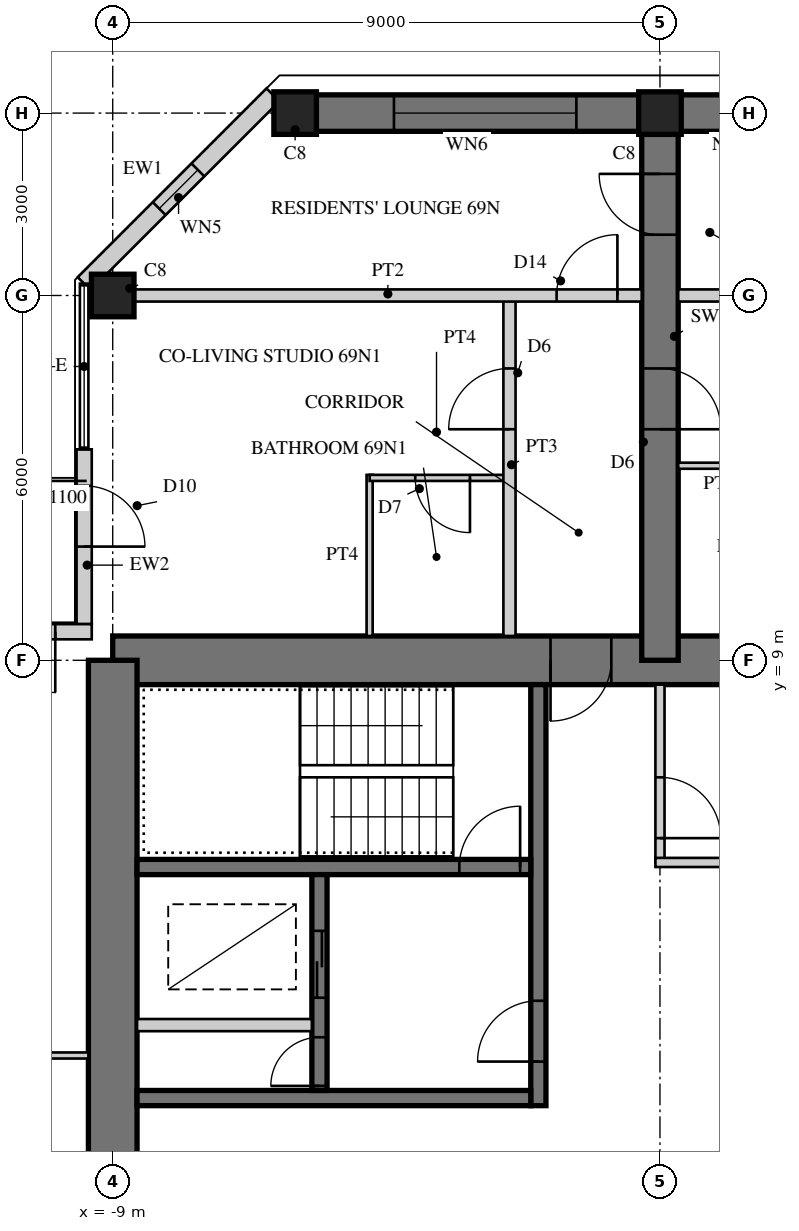
"""IFC4 building model, lengths in metres.
Left out: names, types, materials, properties, quantities, classifications, styles, units other than length and angle.
Written with IfcOpenShell. Run it as: python <this file> out.ifc"""

import sys

from ifc_helpers import new_model, si_unit, direction, frame, frame_2d, origin, origin_2d, place, context, subcontext, project, spatial, rectangle, hollow_rectangle, extrude, element, fill, save


model = new_model("IFC4")
c1 = context("Model", 3, precision=1e-05, world=origin(), true_north=direction((0.0, 1.0)))
c2 = subcontext(c1, "Body", "Model", "MODEL_VIEW")
j1 = project(units=[si_unit("LENGTHUNIT", "METRE"), si_unit("PLANEANGLEUNIT", "RADIAN")], contexts=[c1])
p1 = place(None, origin())
s1 = spatial("IfcSite", under=j1, at=p1, CompositionType="ELEMENT")
p2 = place(p1, origin())
s2 = spatial("IfcBuilding", under=s1, at=p2, CompositionType="ELEMENT")
p3 = place(p2, frame((0.0, 0.0, 267.9)))
s3 = spatial("IfcBuildingStorey", under=s2, at=p3, CompositionType="ELEMENT", Elevation=267.9)
p4 = place(p3, frame((9.0, 9.0, 0.0), z_axis=(0.0, 0.0, 1.0), x_axis=(-1.0, 0.0, 0.0)))
e1 = element("IfcWall", 1, at=p4, inside=s3, PredefinedType="SHEAR", context=c2, shape_type="SweptSolid", body=[
    extrude(rectangle(XDim=18.0, YDim=0.8, at=frame_2d((9.0, 0.0))), origin(), (0.0, 0.0, 1.0), 3.4),
])
p5 = place(p4, frame((9.8, 0.0, 0.0)))
e2 = element("IfcOpeningElement", 2, at=p5, cuts=e1, PredefinedType="OPENING", context=c2, shape_type="SweptSolid", body=[
    extrude(rectangle(XDim=1.0, YDim=2.4, at=frame_2d((0.5, 1.2))), frame((0.0, 0.41, 0.0), z_axis=(0.0, -1.0, 0.0), x_axis=(1.0, 0.0, 0.0)), (0.0, 0.0, 1.0), 0.82),
])
p6 = place(p3, frame((-9.0, 9.0, 0.0), z_axis=(0.0, 0.0, 1.0), x_axis=(0.0, -1.0, 0.0)))
e3 = element("IfcWall", 3, at=p6, inside=s3, PredefinedType="SHEAR", context=c2, shape_type="SweptSolid", body=[
    extrude(rectangle(XDim=18.0, YDim=0.8, at=frame_2d((9.0, 0.0))), origin(), (0.0, 0.0, 1.0), 3.4),
])
p7 = place(p6, frame((9.8, 0.0, 0.0)))
e4 = element("IfcOpeningElement", 4, at=p7, cuts=e3, PredefinedType="OPENING", context=c2, shape_type="SweptSolid", body=[
    extrude(rectangle(XDim=1.0, YDim=2.4, at=frame_2d((0.5, 1.2))), frame((0.0, 0.41, 0.0), z_axis=(0.0, -1.0, 0.0), x_axis=(1.0, 0.0, 0.0)), (0.0, 0.0, 1.0), 0.82),
])
p8 = place(p3, frame((-2.0, 1.675, 0.0), z_axis=(0.0, 0.0, 1.0), x_axis=(0.0, 1.0, 0.0)))
e5 = element("IfcWall", 5, at=p8, inside=s3, PredefinedType="SHEAR", context=c2, shape_type="SweptSolid", body=[
    extrude(rectangle(XDim=6.925, YDim=0.25, at=frame_2d((3.462, 0.0))), origin(), (0.0, 0.0, 1.0), 3.4),
])
p9 = place(p8, frame((0.725, 0.0, 0.0)))
e6 = element("IfcOpeningElement", 6, at=p9, cuts=e5, PredefinedType="OPENING", context=c2, shape_type="SweptSolid", body=[
    extrude(rectangle(XDim=1.0, YDim=2.1, at=frame_2d((0.5, 1.05))), frame((0.0, 0.135, 0.0), z_axis=(0.0, -1.0, 0.0), x_axis=(1.0, 0.0, 0.0)), (0.0, 0.0, 1.0), 0.27),
])
p10 = place(p3, frame((-2.125, 1.8, 0.0), z_axis=(0.0, 0.0, 1.0), x_axis=(-1.0, 0.0, 0.0)))
e7 = element("IfcWall", 7, at=p10, inside=s3, PredefinedType="SHEAR", context=c2, shape_type="SweptSolid", body=[
    extrude(rectangle(XDim=6.475, YDim=0.25, at=frame_2d((3.238, 0.0))), origin(), (0.0, 0.0, 1.0), 3.4),
])
p11 = place(p3, frame((-2.125, 5.6, 0.0), z_axis=(0.0, 0.0, 1.0), x_axis=(-1.0, 0.0, 0.0)))
e8 = element("IfcWall", 8, at=p11, inside=s3, PredefinedType="SHEAR", context=c2, shape_type="SweptSolid", body=[
    extrude(rectangle(XDim=6.475, YDim=0.25, at=frame_2d((3.238, 0.0))), origin(), (0.0, 0.0, 1.0), 3.4),
])
p12 = place(p11, frame((0.175, 0.0, 0.0)))
e9 = element("IfcOpeningElement", 9, at=p12, cuts=e8, PredefinedType="OPENING", context=c2, shape_type="SweptSolid", body=[
    extrude(rectangle(XDim=1.0, YDim=2.1, at=frame_2d((0.5, 1.05))), frame((0.0, 0.135, 0.0), z_axis=(0.0, -1.0, 0.0), x_axis=(1.0, 0.0, 0.0)), (0.0, 0.0, 1.0), 0.27),
])
p13 = place(p3, frame((-5.6, 1.925, 0.0), z_axis=(0.0, 0.0, 1.0), x_axis=(0.0, 1.0, 0.0)))
e10 = element("IfcWall", 10, at=p13, inside=s3, PredefinedType="SHEAR", context=c2, shape_type="SweptSolid", body=[
    extrude(rectangle(XDim=3.55, YDim=0.25, at=frame_2d((1.775, 0.0))), origin(), (0.0, 0.0, 1.0), 3.4),
])
p14 = place(p13, frame((1.525, 0.0, 0.0)))
e11 = element("IfcOpeningElement", 11, at=p14, cuts=e10, PredefinedType="OPENING", context=c2, shape_type="SweptSolid", body=[
    extrude(rectangle(XDim=1.1, YDim=2.2, at=frame_2d((0.55, 1.1))), frame((0.0, 0.135, 0.0), z_axis=(0.0, -1.0, 0.0), x_axis=(1.0, 0.0, 0.0)), (0.0, 0.0, 1.0), 0.27),
])
p15 = place(p13, frame((0.075, 0.0, 0.0)))
e12 = element("IfcOpeningElement", 12, at=p15, cuts=e10, PredefinedType="OPENING", context=c2, shape_type="SweptSolid", body=[
    extrude(rectangle(XDim=0.8, YDim=2.1, at=frame_2d((0.4, 1.05))), frame((0.0, 0.135, 0.0), z_axis=(0.0, -1.0, 0.0), x_axis=(1.0, 0.0, 0.0)), (0.0, 0.0, 1.0), 0.27),
])
p16 = place(p3, frame((-5.725, 3.0, 0.0), z_axis=(0.0, 0.0, 1.0), x_axis=(-1.0, 0.0, 0.0)))
e13 = element("IfcWall", 13, at=p16, inside=s3, PredefinedType="PARTITIONING", context=c2, shape_type="SweptSolid", body=[
    extrude(rectangle(XDim=2.875, YDim=0.2, at=frame_2d((1.438, 0.0))), origin(), (0.0, 0.0, 1.0), 3.4),
])
p17 = place(p3, frame((0.0, 9.0, 0.0), z_axis=(0.0, 0.0, 1.0), x_axis=(0.0, 1.0, 0.0)))
e14 = element("IfcWall", 14, at=p17, inside=s3, PredefinedType="SHEAR", context=c2, shape_type="SweptSolid", body=[
    extrude(rectangle(XDim=9.0, YDim=0.6, at=frame_2d((4.5, 0.0))), origin(), (0.0, 0.0, 1.0), 3.4),
])
p18 = place(p17, frame((3.8, 0.0, 0.0)))
e15 = element("IfcOpeningElement", 15, at=p18, cuts=e14, PredefinedType="OPENING", context=c2, shape_type="SweptSolid", body=[
    extrude(rectangle(XDim=1.0, YDim=2.15, at=frame_2d((0.5, 1.075))), frame((0.0, 0.31, 0.0), z_axis=(0.0, -1.0, 0.0), x_axis=(1.0, 0.0, 0.0)), (0.0, 0.0, 1.0), 0.62),
])
p19 = place(p17, frame((7.0, 0.0, 0.0)))
e16 = element("IfcOpeningElement", 16, at=p19, cuts=e14, PredefinedType="OPENING", context=c2, shape_type="SweptSolid", body=[
    extrude(rectangle(XDim=1.0, YDim=2.2, at=frame_2d((0.5, 1.1))), frame((0.0, 0.31, 0.0), z_axis=(0.0, -1.0, 0.0), x_axis=(1.0, 0.0, 0.0)), (0.0, 0.0, 1.0), 0.62),
])
p20 = place(p3, frame((6.0, 18.0, 0.0), z_axis=(0.0, 0.0, 1.0), x_axis=(-1.0, 0.0, 0.0)))
e17 = element("IfcWall", 17, at=p20, inside=s3, PredefinedType="SHEAR", context=c2, shape_type="SweptSolid", body=[
    extrude(rectangle(XDim=12.0, YDim=0.6, at=frame_2d((6.0, 0.0))), origin(), (0.0, 0.0, 1.0), 3.4),
])
p21 = place(p20, frame((1.625, 0.0, 0.6)))
e18 = element("IfcOpeningElement", 18, at=p21, cuts=e17, PredefinedType="OPENING", context=c2, shape_type="SweptSolid", body=[
    extrude(rectangle(XDim=3.0, YDim=2.4, at=frame_2d((1.5, 1.2))), frame((0.0, 0.31, 0.0), z_axis=(0.0, -1.0, 0.0), x_axis=(1.0, 0.0, 0.0)), (0.0, 0.0, 1.0), 0.62),
])
p22 = place(p20, frame((7.375, 0.0, 0.6)))
e19 = element("IfcOpeningElement", 19, at=p22, cuts=e17, PredefinedType="OPENING", context=c2, shape_type="SweptSolid", body=[
    extrude(rectangle(XDim=3.0, YDim=2.4, at=frame_2d((1.5, 1.2))), frame((0.0, 0.31, 0.0), z_axis=(0.0, -1.0, 0.0), x_axis=(1.0, 0.0, 0.0)), (0.0, 0.0, 1.0), 0.62),
])
for number, where, z_axis, x_axis in (
    (20, (-9.0, 15.0, 0.0), (0.0, 0.0, 1.0), (1.0, 0.0, 0.0)),
    (21, (0.0, 18.0, 0.0), (0.0, 0.0, 1.0), (1.0, 0.0, 0.0)),
    (22, (-6.0, 18.0, 0.0), (0.0, 0.0, 1.0), (1.0, 0.0, 0.0)),
):
    element("IfcColumn", number, at=place(p3, frame(where, z_axis=z_axis, x_axis=x_axis)), inside=s3, PredefinedType="COLUMN", context=c2, shape_type="SweptSolid", body=[
        extrude(rectangle(XDim=0.7, YDim=0.7, at=origin_2d()), origin(), (0.0, 0.0, 1.0), 3.4),
    ])
p23 = place(p3, frame((-6.365, 18.3, 0.0), z_axis=(0.0, 0.0, 1.0), x_axis=(-0.70707898447, -0.707134576811, 0.0)))
e23 = element("IfcWall", 23, at=p23, inside=s3, PredefinedType="SOLIDWALL", context=c2, shape_type="SweptSolid", body=[
    extrude(rectangle(XDim=4.392, YDim=0.3, at=frame_2d((2.196, 0.0))), origin(), (0.0, 0.0, 1.0), 3.22),
])
p24 = place(p23, frame((1.746, 0.0, 0.3)))
e24 = element("IfcOpeningElement", 24, at=p24, cuts=e23, PredefinedType="OPENING", context=c2, shape_type="SweptSolid", body=[
    extrude(rectangle(XDim=0.9, YDim=2.4, at=frame_2d((0.45, 1.2))), frame((0.0, 0.16, 0.0), z_axis=(0.0, -1.0, 0.0), x_axis=(1.0, 0.0, 0.0)), (0.0, 0.0, 1.0), 0.32),
])
p25 = place(p3, frame((-9.47, 12.47, 0.0), z_axis=(0.0, 0.0, 1.0), x_axis=(0.0, -1.0, 0.0)))
e25 = element("IfcWall", 25, at=p25, inside=s3, PredefinedType="SOLIDWALL", context=c2, shape_type="SweptSolid", body=[
    extrude(rectangle(XDim=2.875, YDim=0.25, at=frame_2d((1.438, 0.0))), origin(), (0.0, 0.0, 1.0), 3.22),
])
p26 = place(p25, frame((0.6, 0.0, 0.0)))
e26 = element("IfcOpeningElement", 26, at=p26, cuts=e25, PredefinedType="OPENING", context=c2, shape_type="SweptSolid", body=[
    extrude(rectangle(XDim=1.0, YDim=2.2, at=frame_2d((0.5, 1.1))), frame((0.0, 0.135, 0.0), z_axis=(0.0, -1.0, 0.0), x_axis=(1.0, 0.0, 0.0)), (0.0, 0.0, 1.0), 0.27),
])
p27 = place(p3, frame((-9.345, 9.47, 0.0), z_axis=(0.0, 0.0, 1.0), x_axis=(-1.0, 0.0, 0.0)))
e27 = element("IfcWall", 27, at=p27, inside=s3, PredefinedType="SOLIDWALL", context=c2, shape_type="SweptSolid", body=[
    extrude(rectangle(XDim=3.125, YDim=0.25, at=frame_2d((1.562, 0.0))), origin(), (0.0, 0.0, 1.0), 3.22),
])
p28 = place(p27, frame((0.6, 0.0, 0.0)))
e28 = element("IfcOpeningElement", 28, at=p28, cuts=e27, PredefinedType="OPENING", context=c2, shape_type="SweptSolid", body=[
    extrude(rectangle(XDim=1.0, YDim=2.2, at=frame_2d((0.5, 1.1))), frame((0.0, 0.135, 0.0), z_axis=(0.0, -1.0, 0.0), x_axis=(1.0, 0.0, 0.0)), (0.0, 0.0, 1.0), 0.27),
])
p29 = place(p3, frame((0.0, 5.675, 0.0), z_axis=(0.0, 0.0, 1.0), x_axis=(0.0, 1.0, 0.0)))
e29 = element("IfcWall", 29, at=p29, inside=s3, PredefinedType="PARTITIONING", context=c2, shape_type="SweptSolid", body=[
    extrude(rectangle(XDim=2.925, YDim=0.15, at=frame_2d((1.462, 0.0))), origin(), (0.0, 0.0, 1.0), 3.22),
])
p30 = place(p29, frame((0.4, 0.0, 0.0)))
e30 = element("IfcOpeningElement", 30, at=p30, cuts=e29, PredefinedType="OPENING", context=c2, shape_type="SweptSolid", body=[
    extrude(rectangle(XDim=1.0, YDim=2.1, at=frame_2d((0.5, 1.05))), frame((0.0, 0.085, 0.0), z_axis=(0.0, -1.0, 0.0), x_axis=(1.0, 0.0, 0.0)), (0.0, 0.0, 1.0), 0.17),
])
p31 = place(p3, frame((1.675, 5.675, 0.0), z_axis=(0.0, 0.0, 1.0), x_axis=(-1.0, 0.0, 0.0)))
e31 = element("IfcWall", 31, at=p31, inside=s3, PredefinedType="PARTITIONING", context=c2, shape_type="SweptSolid", body=[
    extrude(rectangle(XDim=1.75, YDim=0.15, at=frame_2d((0.875, 0.0))), origin(), (0.0, 0.0, 1.0), 3.22),
])
p32 = place(p3, frame((-4.775, 9.4, 0.0), z_axis=(0.0, 0.0, 1.0), x_axis=(0.0, 1.0, 0.0)))
e32 = element("IfcWall", 32, at=p32, inside=s3, PredefinedType="PARTITIONING", context=c2, shape_type="SweptSolid", body=[
    extrude(rectangle(XDim=2.65, YDim=0.1, at=frame_2d((1.325, 0.0))), origin(), (0.0, 0.0, 1.0), 3.22),
])
p33 = place(p3, frame((-2.575, 12.0, 0.0), z_axis=(0.0, 0.0, 1.0), x_axis=(-1.0, 0.0, 0.0)))
e33 = element("IfcWall", 33, at=p33, inside=s3, PredefinedType="PARTITIONING", context=c2, shape_type="SweptSolid", body=[
    extrude(rectangle(XDim=2.2, YDim=0.1, at=frame_2d((1.1, 0.0))), origin(), (0.0, 0.0, 1.0), 3.22),
])
p34 = place(p33, frame((0.55, 0.0, 0.0)))
e34 = element("IfcOpeningElement", 34, at=p34, cuts=e33, PredefinedType="OPENING", context=c2, shape_type="SweptSolid", body=[
    extrude(rectangle(XDim=0.9, YDim=2.1, at=frame_2d((0.45, 1.05))), frame((0.0, 0.06, 0.0), z_axis=(0.0, -1.0, 0.0), x_axis=(1.0, 0.0, 0.0)), (0.0, 0.0, 1.0), 0.12),
])
p35 = place(p3, frame((2.9, 12.2, 0.0), z_axis=(0.0, 0.0, 1.0), x_axis=(-1.0, 0.0, 0.0)))
e35 = element("IfcWall", 35, at=p35, inside=s3, PredefinedType="PARTITIONING", context=c2, shape_type="SweptSolid", body=[
    extrude(rectangle(XDim=2.6, YDim=0.1, at=frame_2d((1.3, 0.0))), origin(), (0.0, 0.0, 1.0), 3.22),
])
p36 = place(p35, frame((0.55, 0.0, 0.0)))
e36 = element("IfcOpeningElement", 36, at=p36, cuts=e35, PredefinedType="OPENING", context=c2, shape_type="SweptSolid", body=[
    extrude(rectangle(XDim=0.9, YDim=2.1, at=frame_2d((0.45, 1.05))), frame((0.0, 0.06, 0.0), z_axis=(0.0, -1.0, 0.0), x_axis=(1.0, 0.0, 0.0)), (0.0, 0.0, 1.0), 0.12),
])
p37 = place(p3, frame((-2.475, 9.4, 0.0), z_axis=(0.0, 0.0, 1.0), x_axis=(0.0, 1.0, 0.0)))
e37 = element("IfcWall", 37, at=p37, inside=s3, PredefinedType="SOLIDWALL", context=c2, shape_type="SweptSolid", body=[
    extrude(rectangle(XDim=5.6, YDim=0.2, at=frame_2d((2.8, 0.0))), origin(), (0.0, 0.0, 1.0), 3.22),
])
p38 = place(p37, frame((3.4, 0.0, 0.0)))
e38 = element("IfcOpeningElement", 38, at=p38, cuts=e37, PredefinedType="OPENING", context=c2, shape_type="SweptSolid", body=[
    extrude(rectangle(XDim=1.0, YDim=2.15, at=frame_2d((0.5, 1.075))), frame((0.0, 0.11, 0.0), z_axis=(0.0, -1.0, 0.0), x_axis=(1.0, 0.0, 0.0)), (0.0, 0.0, 1.0), 0.22),
])
p39 = place(p3, frame((8.65, 15.0, 0.0), z_axis=(0.0, 0.0, 1.0), x_axis=(-1.0, 0.0, 0.0)))
e39 = element("IfcWall", 39, at=p39, inside=s3, PredefinedType="SOLIDWALL", context=c2, shape_type="SweptSolid", body=[
    extrude(rectangle(XDim=8.35, YDim=0.2, at=frame_2d((4.175, 0.0))), origin(), (0.0, 0.0, 1.0), 2.52),
])
p40 = place(p3, frame((-0.3, 15.0, 0.0), z_axis=(0.0, 0.0, 1.0), x_axis=(-1.0, 0.0, 0.0)))
e40 = element("IfcWall", 40, at=p40, inside=s3, PredefinedType="SOLIDWALL", context=c2, shape_type="SweptSolid", body=[
    extrude(rectangle(XDim=8.35, YDim=0.2, at=frame_2d((4.175, 0.0))), origin(), (0.0, 0.0, 1.0), 2.52),
])
p41 = place(p40, frame((0.4, 0.0, 0.0)))
e41 = element("IfcOpeningElement", 41, at=p41, cuts=e40, PredefinedType="OPENING", context=c2, shape_type="SweptSolid", body=[
    extrude(rectangle(XDim=1.0, YDim=2.2, at=frame_2d((0.5, 1.1))), frame((0.0, 0.11, 0.0), z_axis=(0.0, -1.0, 0.0), x_axis=(1.0, 0.0, 0.0)), (0.0, 0.0, 1.0), 0.22),
])
p42 = place(p3, frame((-9.4, 2.5, 0.0), z_axis=(0.0, 0.0, 1.0), x_axis=(-1.0, 0.0, 0.0)))
e42 = element("IfcWall", 42, at=p42, inside=s3, PredefinedType="PARTITIONING", context=c2, shape_type="SweptSolid", body=[
    extrude(rectangle(XDim=2.65, YDim=0.1, at=frame_2d((1.325, 0.0))), origin(), (0.0, 0.0, 1.0), 3.22),
])
p43 = place(p22, origin())
e43 = element("IfcWindow", 43, at=p43, inside=s3, PartitioningType="SINGLE_PANEL", PredefinedType="WINDOW", context=c2, shape_type="SweptSolid", body=[
    extrude(hollow_rectangle(XDim=3.0, YDim=2.4, WallThickness=0.06, at=frame_2d((1.5, 1.2))), frame((0.0, 0.03, 0.0), z_axis=(0.0, -1.0, 0.0), x_axis=(1.0, 0.0, 0.0)), (0.0, 0.0, 1.0), 0.06),
    extrude(rectangle(XDim=2.879, YDim=2.279, at=frame_2d((1.5, 1.2))), frame((0.0, 0.03, 0.0), z_axis=(0.0, -1.0, 0.0), x_axis=(1.0, 0.0, 0.0)), (0.0, 0.0, 1.0), 0.06),
])
fill(e19, e43)
p44 = place(p24, origin())
e44 = element("IfcWindow", 44, at=p44, inside=s3, PartitioningType="SINGLE_PANEL", PredefinedType="WINDOW", context=c2, shape_type="SweptSolid", body=[
    extrude(hollow_rectangle(XDim=0.9, YDim=2.4, WallThickness=0.06, at=frame_2d((0.45, 1.2))), frame((0.0, 0.03, 0.0), z_axis=(0.0, -1.0, 0.0), x_axis=(1.0, 0.0, 0.0)), (0.0, 0.0, 1.0), 0.06),
    extrude(rectangle(XDim=0.779, YDim=2.279, at=frame_2d((0.45, 1.2))), frame((0.0, 0.03, 0.0), z_axis=(0.0, -1.0, 0.0), x_axis=(1.0, 0.0, 0.0)), (0.0, 0.0, 1.0), 0.06),
])
fill(e24, e44)
p45 = place(p26, origin())
e45 = element("IfcDoor", 45, at=p45, inside=s3, OperationType="SINGLE_SWING_RIGHT", PredefinedType="DOOR", context=c2, shape_type="SweptSolid", body=[
    extrude(hollow_rectangle(XDim=1.0, YDim=2.2, WallThickness=0.06, at=frame_2d((0.5, 1.1))), frame((0.0, 0.025, 0.0), z_axis=(0.0, -1.0, 0.0), x_axis=(1.0, 0.0, 0.0)), (0.0, 0.0, 1.0), 0.05),
    extrude(rectangle(XDim=0.879, YDim=2.079, at=frame_2d((0.5, 1.1))), frame((0.0, 0.025, 0.0), z_axis=(0.0, -1.0, 0.0), x_axis=(1.0, 0.0, 0.0)), (0.0, 0.0, 1.0), 0.05),
])
fill(e26, e45)
p46 = place(p28, origin())
e46 = element("IfcDoor", 46, at=p46, inside=s3, OperationType="SINGLE_SWING_LEFT", PredefinedType="DOOR", context=c2, shape_type="SweptSolid", body=[
    extrude(hollow_rectangle(XDim=1.0, YDim=2.2, WallThickness=0.06, at=frame_2d((0.5, 1.1))), frame((0.0, 0.025, 0.0), z_axis=(0.0, -1.0, 0.0), x_axis=(1.0, 0.0, 0.0)), (0.0, 0.0, 1.0), 0.05),
    extrude(rectangle(XDim=0.879, YDim=2.079, at=frame_2d((0.5, 1.1))), frame((0.0, 0.025, 0.0), z_axis=(0.0, -1.0, 0.0), x_axis=(1.0, 0.0, 0.0)), (0.0, 0.0, 1.0), 0.05),
])
fill(e28, e46)
p47 = place(p30, frame((1.0, 0.0, 0.0), z_axis=(0.0, 0.0, 1.0), x_axis=(-1.0, 0.0, 0.0)))
e47 = element("IfcDoor", 47, at=p47, inside=s3, OperationType="SINGLE_SWING_RIGHT", PredefinedType="DOOR", context=c2, shape_type="SweptSolid", body=[
    extrude(rectangle(XDim=1.0, YDim=2.1, at=frame_2d((0.5, 1.05))), frame((0.0, 0.025, 0.0), z_axis=(0.0, -1.0, 0.0), x_axis=(1.0, 0.0, 0.0)), (0.0, 0.0, 1.0), 0.05),
])
fill(e30, e47)
p48 = place(p34, origin())
e48 = element("IfcDoor", 48, at=p48, inside=s3, OperationType="SINGLE_SWING_LEFT", PredefinedType="DOOR", context=c2, shape_type="SweptSolid", body=[
    extrude(rectangle(XDim=0.9, YDim=2.1, at=frame_2d((0.45, 1.05))), frame((0.0, 0.025, 0.0), z_axis=(0.0, -1.0, 0.0), x_axis=(1.0, 0.0, 0.0)), (0.0, 0.0, 1.0), 0.05),
])
fill(e34, e48)
p49 = place(p38, origin())
e49 = element("IfcDoor", 49, at=p49, inside=s3, OperationType="SINGLE_SWING_LEFT", PredefinedType="DOOR", context=c2, shape_type="SweptSolid", body=[
    extrude(rectangle(XDim=1.0, YDim=2.15, at=frame_2d((0.5, 1.075))), frame((0.0, 0.025, 0.0), z_axis=(0.0, -1.0, 0.0), x_axis=(1.0, 0.0, 0.0)), (0.0, 0.0, 1.0), 0.05),
])
fill(e38, e49)
p50 = place(p41, frame((1.0, 0.0, 0.0), z_axis=(0.0, 0.0, 1.0), x_axis=(-1.0, 0.0, 0.0)))
e50 = element("IfcDoor", 50, at=p50, inside=s3, OperationType="SINGLE_SWING_RIGHT", PredefinedType="DOOR", context=c2, shape_type="SweptSolid", body=[
    extrude(rectangle(XDim=1.0, YDim=2.2, at=frame_2d((0.5, 1.1))), frame((0.0, 0.025, 0.0), z_axis=(0.0, -1.0, 0.0), x_axis=(1.0, 0.0, 0.0)), (0.0, 0.0, 1.0), 0.05),
])
fill(e41, e50)
p51 = place(p18, frame((1.0, 0.0, 0.0), z_axis=(0.0, 0.0, 1.0), x_axis=(-1.0, 0.0, 0.0)))
e51 = element("IfcDoor", 51, at=p51, inside=s3, OperationType="SINGLE_SWING_RIGHT", PredefinedType="DOOR", context=c2, shape_type="SweptSolid", body=[
    extrude(rectangle(XDim=1.0, YDim=2.15, at=frame_2d((0.5, 1.075))), frame((0.0, 0.025, 0.0), z_axis=(0.0, -1.0, 0.0), x_axis=(1.0, 0.0, 0.0)), (0.0, 0.0, 1.0), 0.05),
])
fill(e15, e51)
p52 = place(p19, origin())
e52 = element("IfcDoor", 52, at=p52, inside=s3, OperationType="SINGLE_SWING_RIGHT", PredefinedType="DOOR", context=c2, shape_type="SweptSolid", body=[
    extrude(rectangle(XDim=1.0, YDim=2.2, at=frame_2d((0.5, 1.1))), frame((0.0, 0.025, 0.0), z_axis=(0.0, -1.0, 0.0), x_axis=(1.0, 0.0, 0.0)), (0.0, 0.0, 1.0), 0.05),
])
fill(e16, e52)
p53 = place(p5, origin())
e53 = element("IfcDoor", 53, at=p53, inside=s3, OperationType="SINGLE_SWING_RIGHT", PredefinedType="DOOR", context=c2, shape_type="SweptSolid", body=[
    extrude(rectangle(XDim=1.0, YDim=2.4, at=frame_2d((0.5, 1.2))), frame((0.0, 0.055, 0.0), z_axis=(0.0, -1.0, 0.0), x_axis=(1.0, 0.0, 0.0)), (0.0, 0.0, 1.0), 0.05),
])
fill(e2, e53)
p54 = place(p9, origin())
e54 = element("IfcDoor", 54, at=p54, inside=s3, OperationType="SINGLE_SWING_LEFT", PredefinedType="DOOR", context=c2, shape_type="SweptSolid", body=[
    extrude(rectangle(XDim=1.0, YDim=2.1, at=frame_2d((0.5, 1.05))), frame((0.0, 0.025, 0.0), z_axis=(0.0, -1.0, 0.0), x_axis=(1.0, 0.0, 0.0)), (0.0, 0.0, 1.0), 0.05),
])
fill(e6, e54)
p55 = place(p12, frame((1.0, 0.0, 0.0), z_axis=(0.0, 0.0, 1.0), x_axis=(-1.0, 0.0, 0.0)))
e55 = element("IfcDoor", 55, at=p55, inside=s3, OperationType="SINGLE_SWING_RIGHT", PredefinedType="DOOR", context=c2, shape_type="SweptSolid", body=[
    extrude(rectangle(XDim=1.0, YDim=2.1, at=frame_2d((0.5, 1.05))), frame((0.0, 0.025, 0.0), z_axis=(0.0, -1.0, 0.0), x_axis=(1.0, 0.0, 0.0)), (0.0, 0.0, 1.0), 0.05),
])
fill(e9, e55)
p56 = place(p14, origin())
e56 = element("IfcDoor", 56, at=p56, inside=s3, OperationType="DOUBLE_DOOR_SLIDING", PredefinedType="DOOR", context=c2, shape_type="SweptSolid", body=[
    extrude(rectangle(XDim=1.1, YDim=2.2, at=frame_2d((0.55, 1.1))), frame((0.0, 0.025, 0.0), z_axis=(0.0, -1.0, 0.0), x_axis=(1.0, 0.0, 0.0)), (0.0, 0.0, 1.0), 0.05),
])
fill(e11, e56)
p57 = place(p15, origin())
e57 = element("IfcDoor", 57, at=p57, inside=s3, OperationType="SINGLE_SWING_LEFT", PredefinedType="DOOR", context=c2, shape_type="SweptSolid", body=[
    extrude(rectangle(XDim=0.8, YDim=2.1, at=frame_2d((0.4, 1.05))), frame((0.0, 0.025, 0.0), z_axis=(0.0, -1.0, 0.0), x_axis=(1.0, 0.0, 0.0)), (0.0, 0.0, 1.0), 0.05),
])
fill(e12, e57)
save(model, sys.argv[1])
